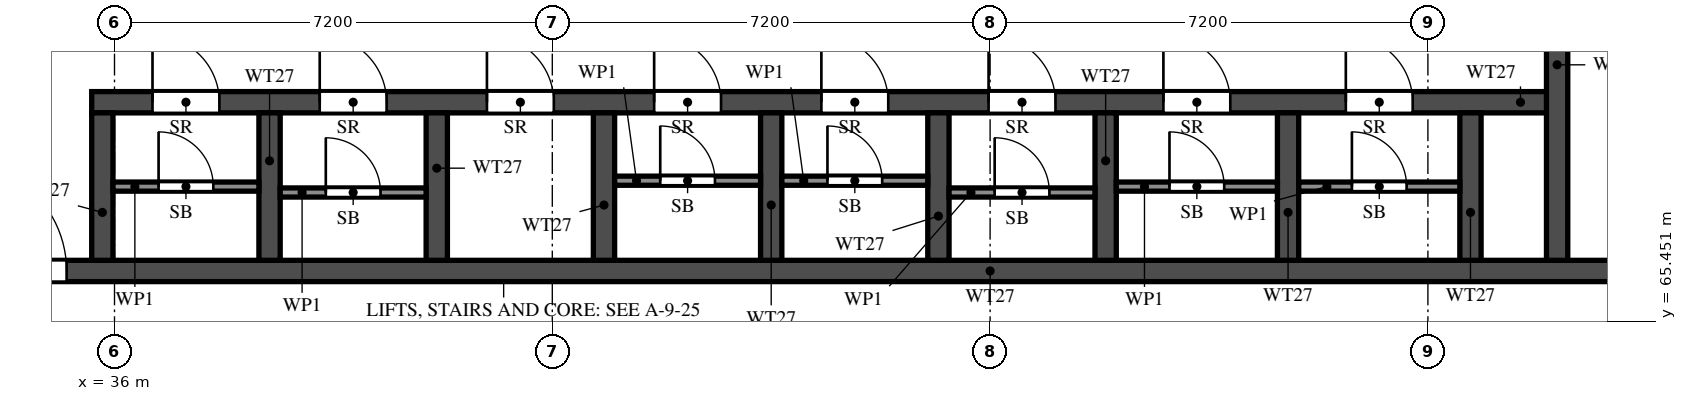
"""IFC4 building model, lengths in metres.
Left out: names, types, materials, properties, quantities, classifications, styles, units other than length and angle.
Written with IfcOpenShell. Run it as: python <this file> out.ifc"""

import sys

from ifc_helpers import new_model, si_unit, direction, frame, frame_2d, origin, place, context, subcontext, project, spatial, rectangle, extrude, element, fill, save


model = new_model("IFC4")
c1 = context("Model", 3, precision=1e-05, world=origin(), true_north=direction((0.0, 1.0)))
c2 = subcontext(c1, "Body", "Model", "MODEL_VIEW")
j1 = project(units=[si_unit("LENGTHUNIT", "METRE"), si_unit("PLANEANGLEUNIT", "RADIAN")], contexts=[c1])
p1 = place(None, origin())
s1 = spatial("IfcSite", under=j1, at=p1, CompositionType="ELEMENT")
p2 = place(p1, origin())
s2 = spatial("IfcBuilding", under=s1, at=p2, CompositionType="ELEMENT")
p3 = place(p2, frame((0.0, 0.0, 185.0)))
s3 = spatial("IfcBuildingStorey", under=s2, at=p3, CompositionType="ELEMENT", Elevation=185.0)
p4 = place(p3, frame((29.7, 66.275, 0.0), z_axis=(0.0, 0.0, 1.0), x_axis=(1.0, 0.0, 0.0)))
e1 = element("IfcWall", 1, at=p4, inside=s3, PredefinedType="SHEAR", context=c2, shape_type="SweptSolid", body=[
    extrude(rectangle(XDim=41.4, YDim=0.35, at=frame_2d((20.7, 0.0))), origin(), (0.0, 0.0, 1.0), 3.2),
])
p5 = place(p4, frame((0.925, 0.0, 0.0)))
e2 = element("IfcOpeningElement", 2, at=p5, cuts=e1, PredefinedType="OPENING", context=c2, shape_type="SweptSolid", body=[
    extrude(rectangle(XDim=1.1, YDim=2.1, at=frame_2d((0.55, 1.05))), frame((0.0, 0.185, 0.0), z_axis=(0.0, -1.0, 0.0), x_axis=(1.0, 0.0, 0.0)), (0.0, 0.0, 1.0), 0.37),
])
p6 = place(p4, frame((3.712, 0.0, 0.0)))
e3 = element("IfcOpeningElement", 3, at=p6, cuts=e1, PredefinedType="OPENING", context=c2, shape_type="SweptSolid", body=[
    extrude(rectangle(XDim=1.8, YDim=2.1, at=frame_2d((0.9, 1.05))), frame((0.0, 0.185, 0.0), z_axis=(0.0, -1.0, 0.0), x_axis=(1.0, 0.0, 0.0)), (0.0, 0.0, 1.0), 0.37),
])
p7 = place(p3, frame((35.625, 69.05, 0.0), z_axis=(0.0, 0.0, 1.0), x_axis=(1.0, 0.0, 0.0)))
e4 = element("IfcWall", 4, at=p7, inside=s3, PredefinedType="SHEAR", context=c2, shape_type="SweptSolid", body=[
    extrude(rectangle(XDim=24.1, YDim=0.35, at=frame_2d((12.05, 0.0))), origin(), (0.0, 0.0, 1.0), 3.2),
])
p8 = place(p7, frame((1.0, 0.0, 0.0)))
e5 = element("IfcOpeningElement", 5, at=p8, cuts=e4, PredefinedType="OPENING", context=c2, shape_type="SweptSolid", body=[
    extrude(rectangle(XDim=1.1, YDim=2.1, at=frame_2d((0.55, 1.05))), frame((0.0, 0.185, 0.0), z_axis=(0.0, -1.0, 0.0), x_axis=(1.0, 0.0, 0.0)), (0.0, 0.0, 1.0), 0.37),
])
p9 = place(p7, frame((3.75, 0.0, 0.0)))
e6 = element("IfcOpeningElement", 6, at=p9, cuts=e4, PredefinedType="OPENING", context=c2, shape_type="SweptSolid", body=[
    extrude(rectangle(XDim=1.1, YDim=2.1, at=frame_2d((0.55, 1.05))), frame((0.0, 0.185, 0.0), z_axis=(0.0, -1.0, 0.0), x_axis=(1.0, 0.0, 0.0)), (0.0, 0.0, 1.0), 0.37),
])
p10 = place(p7, frame((6.5, 0.0, 0.0)))
e7 = element("IfcOpeningElement", 7, at=p10, cuts=e4, PredefinedType="OPENING", context=c2, shape_type="SweptSolid", body=[
    extrude(rectangle(XDim=1.1, YDim=2.1, at=frame_2d((0.55, 1.05))), frame((0.0, 0.185, 0.0), z_axis=(0.0, -1.0, 0.0), x_axis=(1.0, 0.0, 0.0)), (0.0, 0.0, 1.0), 0.37),
])
p11 = place(p7, frame((9.25, 0.0, 0.0)))
e8 = element("IfcOpeningElement", 8, at=p11, cuts=e4, PredefinedType="OPENING", context=c2, shape_type="SweptSolid", body=[
    extrude(rectangle(XDim=1.1, YDim=2.1, at=frame_2d((0.55, 1.05))), frame((0.0, 0.185, 0.0), z_axis=(0.0, -1.0, 0.0), x_axis=(1.0, 0.0, 0.0)), (0.0, 0.0, 1.0), 0.37),
])
p12 = place(p7, frame((12.0, 0.0, 0.0)))
e9 = element("IfcOpeningElement", 9, at=p12, cuts=e4, PredefinedType="OPENING", context=c2, shape_type="SweptSolid", body=[
    extrude(rectangle(XDim=1.1, YDim=2.1, at=frame_2d((0.55, 1.05))), frame((0.0, 0.185, 0.0), z_axis=(0.0, -1.0, 0.0), x_axis=(1.0, 0.0, 0.0)), (0.0, 0.0, 1.0), 0.37),
])
p13 = place(p7, frame((14.75, 0.0, 0.0)))
e10 = element("IfcOpeningElement", 10, at=p13, cuts=e4, PredefinedType="OPENING", context=c2, shape_type="SweptSolid", body=[
    extrude(rectangle(XDim=1.1, YDim=2.1, at=frame_2d((0.55, 1.05))), frame((0.0, 0.185, 0.0), z_axis=(0.0, -1.0, 0.0), x_axis=(1.0, 0.0, 0.0)), (0.0, 0.0, 1.0), 0.37),
])
p14 = place(p7, frame((17.625, 0.0, 0.0)))
e11 = element("IfcOpeningElement", 11, at=p14, cuts=e4, PredefinedType="OPENING", context=c2, shape_type="SweptSolid", body=[
    extrude(rectangle(XDim=1.1, YDim=2.1, at=frame_2d((0.55, 1.05))), frame((0.0, 0.185, 0.0), z_axis=(0.0, -1.0, 0.0), x_axis=(1.0, 0.0, 0.0)), (0.0, 0.0, 1.0), 0.37),
])
p15 = place(p7, frame((20.625, 0.0, 0.0)))
e12 = element("IfcOpeningElement", 12, at=p15, cuts=e4, PredefinedType="OPENING", context=c2, shape_type="SweptSolid", body=[
    extrude(rectangle(XDim=1.1, YDim=2.1, at=frame_2d((0.55, 1.05))), frame((0.0, 0.185, 0.0), z_axis=(0.0, -1.0, 0.0), x_axis=(1.0, 0.0, 0.0)), (0.0, 0.0, 1.0), 0.37),
])
p16 = place(p3, frame((59.725, 66.45, 0.0), z_axis=(0.0, 0.0, 1.0), x_axis=(0.0, 1.0, 0.0)))
e13 = element("IfcWall", 13, at=p16, inside=s3, PredefinedType="SHEAR", context=c2, shape_type="SweptSolid", body=[
    extrude(rectangle(XDim=6.125, YDim=0.35, at=frame_2d((3.062, 0.0))), origin(), (0.0, 0.0, 1.0), 3.2),
])
p17 = place(p16, frame((3.85, 0.0, 0.0)))
e14 = element("IfcOpeningElement", 14, at=p17, cuts=e13, PredefinedType="OPENING", context=c2, shape_type="SweptSolid", body=[
    extrude(rectangle(XDim=1.2, YDim=2.1, at=frame_2d((0.6, 1.05))), frame((0.0, 0.185, 0.0), z_axis=(0.0, -1.0, 0.0), x_axis=(1.0, 0.0, 0.0)), (0.0, 0.0, 1.0), 0.37),
])
for number, where, z_axis, x_axis in (
    (15, (35.8, 66.45, 0.0), (0.0, 0.0, 1.0), (0.0, 1.0, 0.0)),
    (16, (38.55, 66.45, 0.0), (0.0, 0.0, 1.0), (0.0, 1.0, 0.0)),
    (17, (41.3, 66.45, 0.0), (0.0, 0.0, 1.0), (0.0, 1.0, 0.0)),
    (18, (44.05, 66.45, 0.0), (0.0, 0.0, 1.0), (0.0, 1.0, 0.0)),
    (19, (46.8, 66.45, 0.0), (0.0, 0.0, 1.0), (0.0, 1.0, 0.0)),
    (20, (49.55, 66.45, 0.0), (0.0, 0.0, 1.0), (0.0, 1.0, 0.0)),
    (21, (52.3, 66.45, 0.0), (0.0, 0.0, 1.0), (0.0, 1.0, 0.0)),
    (22, (55.3, 66.45, 0.0), (0.0, 0.0, 1.0), (0.0, 1.0, 0.0)),
    (23, (58.3, 66.45, 0.0), (0.0, 0.0, 1.0), (0.0, 1.0, 0.0)),
):
    element("IfcWall", number, at=place(p3, frame(where, z_axis=z_axis, x_axis=x_axis)), inside=s3, PredefinedType="SHEAR", context=c2, shape_type="SweptSolid", body=[
        extrude(rectangle(XDim=2.425, YDim=0.35, at=frame_2d((1.212, 0.0))), origin(), (0.0, 0.0, 1.0), 3.2),
    ])
p18 = place(p3, frame((35.975, 67.663, 0.0), z_axis=(0.0, 0.0, 1.0), x_axis=(1.0, 0.0, 0.0)))
e24 = element("IfcWall", 24, at=p18, inside=s3, PredefinedType="PARTITIONING", context=c2, shape_type="SweptSolid", body=[
    extrude(rectangle(XDim=2.4, YDim=0.15, at=frame_2d((1.2, 0.0))), origin(), (0.0, 0.0, 1.0), 3.2),
])
p19 = place(p18, frame((0.75, 0.0, 0.0)))
e25 = element("IfcOpeningElement", 25, at=p19, cuts=e24, PredefinedType="OPENING", context=c2, shape_type="SweptSolid", body=[
    extrude(rectangle(XDim=0.9, YDim=2.1, at=frame_2d((0.45, 1.05))), frame((0.0, 0.085, 0.0), z_axis=(0.0, -1.0, 0.0), x_axis=(1.0, 0.0, 0.0)), (0.0, 0.0, 1.0), 0.17),
])
p20 = place(p3, frame((38.725, 67.565, 0.0), z_axis=(0.0, 0.0, 1.0), x_axis=(1.0, 0.0, 0.0)))
e26 = element("IfcWall", 26, at=p20, inside=s3, PredefinedType="PARTITIONING", context=c2, shape_type="SweptSolid", body=[
    extrude(rectangle(XDim=2.4, YDim=0.15, at=frame_2d((1.2, 0.0))), origin(), (0.0, 0.0, 1.0), 3.2),
])
p21 = place(p20, frame((0.75, 0.0, 0.0)))
e27 = element("IfcOpeningElement", 27, at=p21, cuts=e26, PredefinedType="OPENING", context=c2, shape_type="SweptSolid", body=[
    extrude(rectangle(XDim=0.9, YDim=2.1, at=frame_2d((0.45, 1.05))), frame((0.0, 0.085, 0.0), z_axis=(0.0, -1.0, 0.0), x_axis=(1.0, 0.0, 0.0)), (0.0, 0.0, 1.0), 0.17),
])
p22 = place(p3, frame((44.225, 67.76, 0.0), z_axis=(0.0, 0.0, 1.0), x_axis=(1.0, 0.0, 0.0)))
e28 = element("IfcWall", 28, at=p22, inside=s3, PredefinedType="PARTITIONING", context=c2, shape_type="SweptSolid", body=[
    extrude(rectangle(XDim=2.4, YDim=0.15, at=frame_2d((1.2, 0.0))), origin(), (0.0, 0.0, 1.0), 3.2),
])
p23 = place(p22, frame((0.75, 0.0, 0.0)))
e29 = element("IfcOpeningElement", 29, at=p23, cuts=e28, PredefinedType="OPENING", context=c2, shape_type="SweptSolid", body=[
    extrude(rectangle(XDim=0.9, YDim=2.1, at=frame_2d((0.45, 1.05))), frame((0.0, 0.085, 0.0), z_axis=(0.0, -1.0, 0.0), x_axis=(1.0, 0.0, 0.0)), (0.0, 0.0, 1.0), 0.17),
])
p24 = place(p3, frame((46.975, 67.76, 0.0), z_axis=(0.0, 0.0, 1.0), x_axis=(1.0, 0.0, 0.0)))
e30 = element("IfcWall", 30, at=p24, inside=s3, PredefinedType="PARTITIONING", context=c2, shape_type="SweptSolid", body=[
    extrude(rectangle(XDim=2.4, YDim=0.15, at=frame_2d((1.2, 0.0))), origin(), (0.0, 0.0, 1.0), 3.2),
])
p25 = place(p24, frame((0.75, 0.0, 0.0)))
e31 = element("IfcOpeningElement", 31, at=p25, cuts=e30, PredefinedType="OPENING", context=c2, shape_type="SweptSolid", body=[
    extrude(rectangle(XDim=0.9, YDim=2.1, at=frame_2d((0.45, 1.05))), frame((0.0, 0.085, 0.0), z_axis=(0.0, -1.0, 0.0), x_axis=(1.0, 0.0, 0.0)), (0.0, 0.0, 1.0), 0.17),
])
p26 = place(p3, frame((49.725, 67.565, 0.0), z_axis=(0.0, 0.0, 1.0), x_axis=(1.0, 0.0, 0.0)))
e32 = element("IfcWall", 32, at=p26, inside=s3, PredefinedType="PARTITIONING", context=c2, shape_type="SweptSolid", body=[
    extrude(rectangle(XDim=2.4, YDim=0.15, at=frame_2d((1.2, 0.0))), origin(), (0.0, 0.0, 1.0), 3.2),
])
p27 = place(p26, frame((0.75, 0.0, 0.0)))
e33 = element("IfcOpeningElement", 33, at=p27, cuts=e32, PredefinedType="OPENING", context=c2, shape_type="SweptSolid", body=[
    extrude(rectangle(XDim=0.9, YDim=2.1, at=frame_2d((0.45, 1.05))), frame((0.0, 0.085, 0.0), z_axis=(0.0, -1.0, 0.0), x_axis=(1.0, 0.0, 0.0)), (0.0, 0.0, 1.0), 0.17),
])
p28 = place(p3, frame((52.475, 67.663, 0.0), z_axis=(0.0, 0.0, 1.0), x_axis=(1.0, 0.0, 0.0)))
e34 = element("IfcWall", 34, at=p28, inside=s3, PredefinedType="PARTITIONING", context=c2, shape_type="SweptSolid", body=[
    extrude(rectangle(XDim=2.65, YDim=0.15, at=frame_2d((1.325, 0.0))), origin(), (0.0, 0.0, 1.0), 3.2),
])
p29 = place(p28, frame((0.875, 0.0, 0.0)))
e35 = element("IfcOpeningElement", 35, at=p29, cuts=e34, PredefinedType="OPENING", context=c2, shape_type="SweptSolid", body=[
    extrude(rectangle(XDim=0.9, YDim=2.1, at=frame_2d((0.45, 1.05))), frame((0.0, 0.085, 0.0), z_axis=(0.0, -1.0, 0.0), x_axis=(1.0, 0.0, 0.0)), (0.0, 0.0, 1.0), 0.17),
])
p30 = place(p3, frame((55.475, 67.663, 0.0), z_axis=(0.0, 0.0, 1.0), x_axis=(1.0, 0.0, 0.0)))
e36 = element("IfcWall", 36, at=p30, inside=s3, PredefinedType="PARTITIONING", context=c2, shape_type="SweptSolid", body=[
    extrude(rectangle(XDim=2.65, YDim=0.15, at=frame_2d((1.325, 0.0))), origin(), (0.0, 0.0, 1.0), 3.2),
])
p31 = place(p30, frame((0.875, 0.0, 0.0)))
e37 = element("IfcOpeningElement", 37, at=p31, cuts=e36, PredefinedType="OPENING", context=c2, shape_type="SweptSolid", body=[
    extrude(rectangle(XDim=0.9, YDim=2.1, at=frame_2d((0.45, 1.05))), frame((0.0, 0.085, 0.0), z_axis=(0.0, -1.0, 0.0), x_axis=(1.0, 0.0, 0.0)), (0.0, 0.0, 1.0), 0.17),
])
p32 = place(p6, origin())
e38 = element("IfcDoor", 38, at=p32, inside=s3, OperationType="DOUBLE_DOOR_SINGLE_SWING", PredefinedType="DOOR", context=c2, shape_type="SweptSolid", body=[
    extrude(rectangle(XDim=1.8, YDim=2.1, at=frame_2d((0.9, 1.05))), frame((0.0, 0.025, 0.0), z_axis=(0.0, -1.0, 0.0), x_axis=(1.0, 0.0, 0.0)), (0.0, 0.0, 1.0), 0.05),
])
fill(e3, e38)
p33 = place(p8, origin())
e39 = element("IfcDoor", 39, at=p33, inside=s3, OperationType="SINGLE_SWING_RIGHT", PredefinedType="DOOR", context=c2, shape_type="SweptSolid", body=[
    extrude(rectangle(XDim=1.1, YDim=2.1, at=frame_2d((0.55, 1.05))), frame((0.0, 0.025, 0.0), z_axis=(0.0, -1.0, 0.0), x_axis=(1.0, 0.0, 0.0)), (0.0, 0.0, 1.0), 0.05),
])
fill(e5, e39)
p34 = place(p19, origin())
e40 = element("IfcDoor", 40, at=p34, inside=s3, OperationType="SINGLE_SWING_RIGHT", PredefinedType="DOOR", context=c2, shape_type="SweptSolid", body=[
    extrude(rectangle(XDim=0.9, YDim=2.1, at=frame_2d((0.45, 1.05))), frame((0.0, 0.025, 0.0), z_axis=(0.0, -1.0, 0.0), x_axis=(1.0, 0.0, 0.0)), (0.0, 0.0, 1.0), 0.05),
])
fill(e25, e40)
p35 = place(p9, origin())
e41 = element("IfcDoor", 41, at=p35, inside=s3, OperationType="SINGLE_SWING_LEFT", PredefinedType="DOOR", context=c2, shape_type="SweptSolid", body=[
    extrude(rectangle(XDim=1.1, YDim=2.1, at=frame_2d((0.55, 1.05))), frame((0.0, 0.025, 0.0), z_axis=(0.0, -1.0, 0.0), x_axis=(1.0, 0.0, 0.0)), (0.0, 0.0, 1.0), 0.05),
])
fill(e6, e41)
p36 = place(p21, origin())
e42 = element("IfcDoor", 42, at=p36, inside=s3, OperationType="SINGLE_SWING_LEFT", PredefinedType="DOOR", context=c2, shape_type="SweptSolid", body=[
    extrude(rectangle(XDim=0.9, YDim=2.1, at=frame_2d((0.45, 1.05))), frame((0.0, 0.025, 0.0), z_axis=(0.0, -1.0, 0.0), x_axis=(1.0, 0.0, 0.0)), (0.0, 0.0, 1.0), 0.05),
])
fill(e27, e42)
p37 = place(p10, origin())
e43 = element("IfcDoor", 43, at=p37, inside=s3, OperationType="SINGLE_SWING_RIGHT", PredefinedType="DOOR", context=c2, shape_type="SweptSolid", body=[
    extrude(rectangle(XDim=1.1, YDim=2.1, at=frame_2d((0.55, 1.05))), frame((0.0, 0.025, 0.0), z_axis=(0.0, -1.0, 0.0), x_axis=(1.0, 0.0, 0.0)), (0.0, 0.0, 1.0), 0.05),
])
fill(e7, e43)
p38 = place(p11, origin())
e44 = element("IfcDoor", 44, at=p38, inside=s3, OperationType="SINGLE_SWING_LEFT", PredefinedType="DOOR", context=c2, shape_type="SweptSolid", body=[
    extrude(rectangle(XDim=1.1, YDim=2.1, at=frame_2d((0.55, 1.05))), frame((0.0, 0.025, 0.0), z_axis=(0.0, -1.0, 0.0), x_axis=(1.0, 0.0, 0.0)), (0.0, 0.0, 1.0), 0.05),
])
fill(e8, e44)
p39 = place(p23, origin())
e45 = element("IfcDoor", 45, at=p39, inside=s3, OperationType="SINGLE_SWING_RIGHT", PredefinedType="DOOR", context=c2, shape_type="SweptSolid", body=[
    extrude(rectangle(XDim=0.9, YDim=2.1, at=frame_2d((0.45, 1.05))), frame((0.0, 0.025, 0.0), z_axis=(0.0, -1.0, 0.0), x_axis=(1.0, 0.0, 0.0)), (0.0, 0.0, 1.0), 0.05),
])
fill(e29, e45)
p40 = place(p12, origin())
e46 = element("IfcDoor", 46, at=p40, inside=s3, OperationType="SINGLE_SWING_RIGHT", PredefinedType="DOOR", context=c2, shape_type="SweptSolid", body=[
    extrude(rectangle(XDim=1.1, YDim=2.1, at=frame_2d((0.55, 1.05))), frame((0.0, 0.025, 0.0), z_axis=(0.0, -1.0, 0.0), x_axis=(1.0, 0.0, 0.0)), (0.0, 0.0, 1.0), 0.05),
])
fill(e9, e46)
p41 = place(p25, origin())
e47 = element("IfcDoor", 47, at=p41, inside=s3, OperationType="SINGLE_SWING_LEFT", PredefinedType="DOOR", context=c2, shape_type="SweptSolid", body=[
    extrude(rectangle(XDim=0.9, YDim=2.1, at=frame_2d((0.45, 1.05))), frame((0.0, 0.025, 0.0), z_axis=(0.0, -1.0, 0.0), x_axis=(1.0, 0.0, 0.0)), (0.0, 0.0, 1.0), 0.05),
])
fill(e31, e47)
p42 = place(p13, origin())
e48 = element("IfcDoor", 48, at=p42, inside=s3, OperationType="SINGLE_SWING_LEFT", PredefinedType="DOOR", context=c2, shape_type="SweptSolid", body=[
    extrude(rectangle(XDim=1.1, YDim=2.1, at=frame_2d((0.55, 1.05))), frame((0.0, 0.025, 0.0), z_axis=(0.0, -1.0, 0.0), x_axis=(1.0, 0.0, 0.0)), (0.0, 0.0, 1.0), 0.05),
])
fill(e10, e48)
p43 = place(p27, origin())
e49 = element("IfcDoor", 49, at=p43, inside=s3, OperationType="SINGLE_SWING_LEFT", PredefinedType="DOOR", context=c2, shape_type="SweptSolid", body=[
    extrude(rectangle(XDim=0.9, YDim=2.1, at=frame_2d((0.45, 1.05))), frame((0.0, 0.025, 0.0), z_axis=(0.0, -1.0, 0.0), x_axis=(1.0, 0.0, 0.0)), (0.0, 0.0, 1.0), 0.05),
])
fill(e33, e49)
p44 = place(p14, origin())
e50 = element("IfcDoor", 50, at=p44, inside=s3, OperationType="SINGLE_SWING_RIGHT", PredefinedType="DOOR", context=c2, shape_type="SweptSolid", body=[
    extrude(rectangle(XDim=1.1, YDim=2.1, at=frame_2d((0.55, 1.05))), frame((0.0, 0.025, 0.0), z_axis=(0.0, -1.0, 0.0), x_axis=(1.0, 0.0, 0.0)), (0.0, 0.0, 1.0), 0.05),
])
fill(e11, e50)
p45 = place(p29, origin())
e51 = element("IfcDoor", 51, at=p45, inside=s3, OperationType="SINGLE_SWING_LEFT", PredefinedType="DOOR", context=c2, shape_type="SweptSolid", body=[
    extrude(rectangle(XDim=0.9, YDim=2.1, at=frame_2d((0.45, 1.05))), frame((0.0, 0.025, 0.0), z_axis=(0.0, -1.0, 0.0), x_axis=(1.0, 0.0, 0.0)), (0.0, 0.0, 1.0), 0.05),
])
fill(e35, e51)
p46 = place(p15, origin())
e52 = element("IfcDoor", 52, at=p46, inside=s3, OperationType="SINGLE_SWING_RIGHT", PredefinedType="DOOR", context=c2, shape_type="SweptSolid", body=[
    extrude(rectangle(XDim=1.1, YDim=2.1, at=frame_2d((0.55, 1.05))), frame((0.0, 0.025, 0.0), z_axis=(0.0, -1.0, 0.0), x_axis=(1.0, 0.0, 0.0)), (0.0, 0.0, 1.0), 0.05),
])
fill(e12, e52)
p47 = place(p31, origin())
e53 = element("IfcDoor", 53, at=p47, inside=s3, OperationType="SINGLE_SWING_LEFT", PredefinedType="DOOR", context=c2, shape_type="SweptSolid", body=[
    extrude(rectangle(XDim=0.9, YDim=2.1, at=frame_2d((0.45, 1.05))), frame((0.0, 0.025, 0.0), z_axis=(0.0, -1.0, 0.0), x_axis=(1.0, 0.0, 0.0)), (0.0, 0.0, 1.0), 0.05),
])
fill(e37, e53)
save(model, sys.argv[1])
